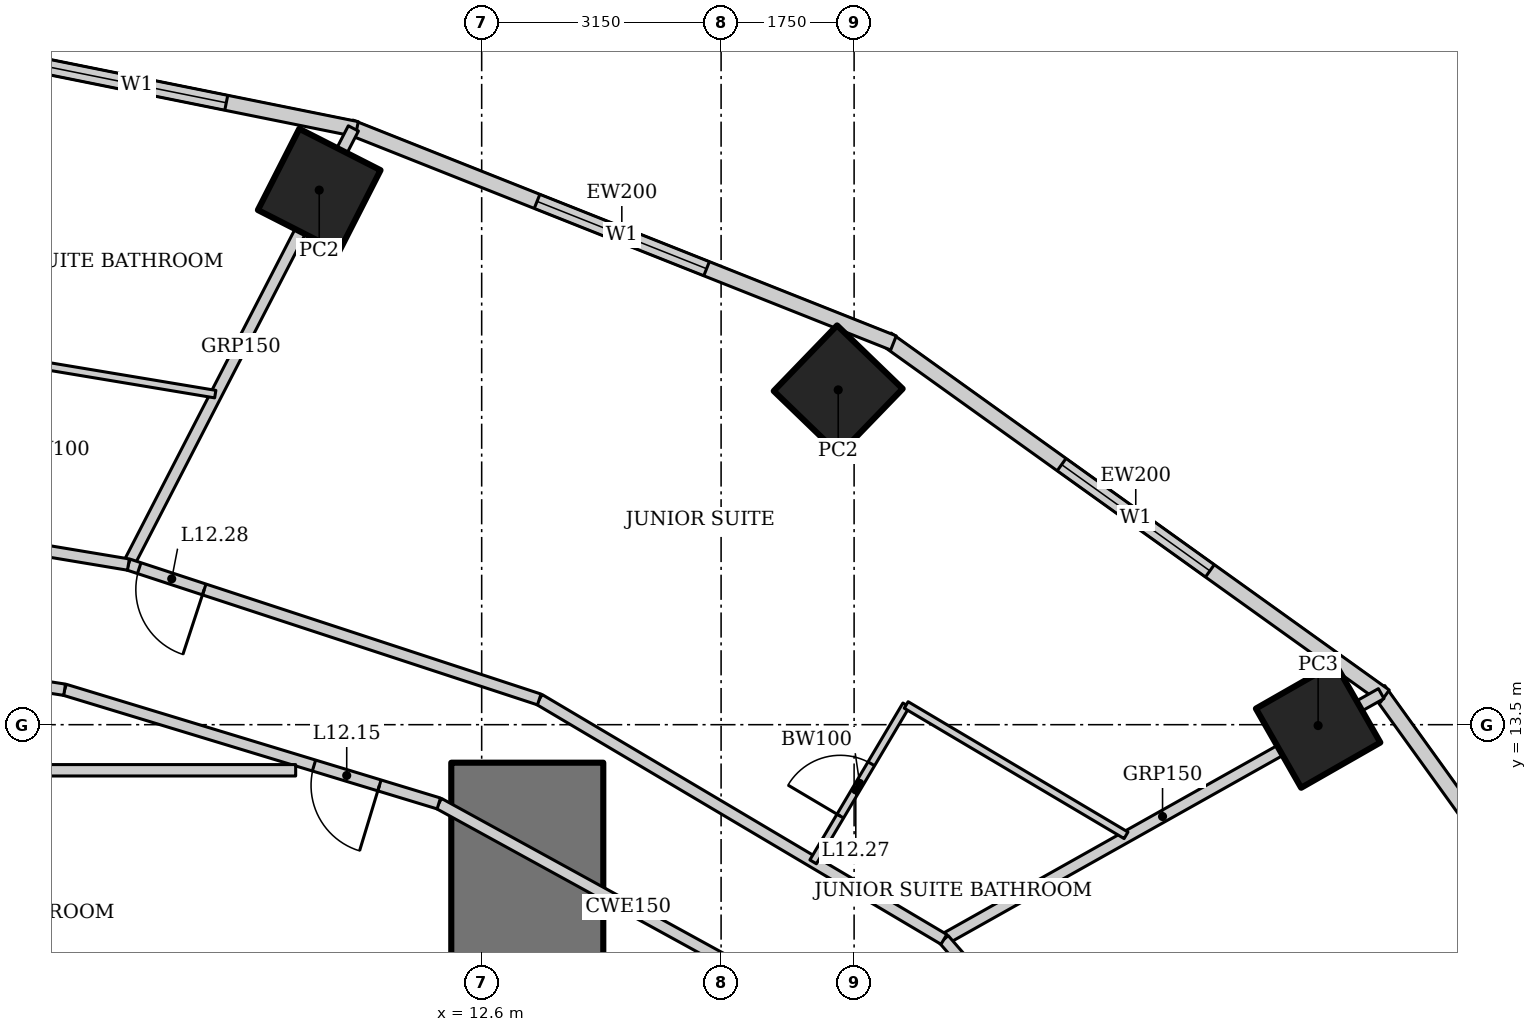
"""IFC4 building model, lengths in metres.
Left out: names, types, materials, properties, quantities, classifications, styles, units other than length and angle.
Written with IfcOpenShell. Run it as: python <this file> out.ifc"""

import sys

from ifc_helpers import new_model, si_unit, direction, frame, frame_2d, origin, origin_2d, place, context, subcontext, project, spatial, rectangle, hollow_rectangle, extrude, element, fill, save


model = new_model("IFC4")
c1 = context("Model", 3, precision=1e-05, world=origin(), true_north=direction((0.0, 1.0)))
c2 = subcontext(c1, "Body", "Model", "MODEL_VIEW")
j1 = project(units=[si_unit("LENGTHUNIT", "METRE"), si_unit("PLANEANGLEUNIT", "RADIAN")], contexts=[c1])
p1 = place(None, origin())
s1 = spatial("IfcSite", under=j1, at=p1, CompositionType="ELEMENT")
p2 = place(p1, origin())
s2 = spatial("IfcBuilding", under=s1, at=p2, CompositionType="ELEMENT")
p3 = place(p2, frame((0.0, 0.0, 58.6)))
s3 = spatial("IfcBuildingStorey", under=s2, at=p3, CompositionType="ELEMENT", Elevation=58.6)
p4 = place(p3, frame((23.605, 13.489, 0.0), z_axis=(0.0, 0.0, 1.0), x_axis=(0.86824298017, 0.496139221777, 0.0)))
e1 = element("IfcColumn", 1, at=p4, inside=s3, PredefinedType="COLUMN", context=c2, shape_type="SweptSolid", body=[
    extrude(hollow_rectangle(XDim=1.2, YDim=1.2, WallThickness=0.12, at=origin_2d()), origin(), (0.0, 0.0, 1.0), 3.6),
])
for number, where, z_axis, x_axis in (
    (2, (17.291, 17.905, 0.0), (0.0, 0.0, 1.0), (0.695, 0.719, 0.0)),
    (3, (10.463, 20.534, 0.0), (0.0, 0.0, 1.0), (0.454, 0.891, 0.0)),
):
    element("IfcColumn", number, at=place(p3, frame(where, z_axis=z_axis, x_axis=x_axis)), inside=s3, PredefinedType="COLUMN", context=c2, shape_type="SweptSolid", body=[
        extrude(hollow_rectangle(XDim=1.2, YDim=1.2, WallThickness=0.1, at=origin_2d()), origin(), (0.0, 0.0, 1.0), 3.6),
    ])
p5 = place(p3, frame((13.2, -13.0, 0.0), z_axis=(0.0, 0.0, 1.0), x_axis=(0.0, 1.0, 0.0)))
e4 = element("IfcWall", 4, at=p5, inside=s3, PredefinedType="SHEAR", context=c2, shape_type="SweptSolid", body=[
    extrude(rectangle(XDim=26.0, YDim=2.0, at=frame_2d((13.0, 0.0))), origin(), (0.0, 0.0, 1.0), 3.6),
])
p6 = place(p5, frame((12.1, 0.0, 0.0)))
e5 = element("IfcOpeningElement", 5, at=p6, cuts=e4, PredefinedType="OPENING", context=c2, shape_type="SweptSolid", body=[
    extrude(rectangle(XDim=1.8, YDim=2.1, at=frame_2d((0.9, 1.05))), frame((0.0, 1.01, 0.0), z_axis=(0.0, -1.0, 0.0), x_axis=(1.0, 0.0, 0.0)), (0.0, 0.0, 1.0), 2.02),
])
p7 = place(p3, frame((29.26, 7.2, 0.0), z_axis=(0.0, 0.0, 1.0), x_axis=(-0.583937613703, 0.811798536155, 0.0)))
e6 = element("IfcWall", 6, at=p7, inside=s3, PredefinedType="SOLIDWALL", context=c2, shape_type="SweptSolid", body=[
    extrude(rectangle(XDim=8.323, YDim=0.2, at=frame_2d((4.162, 0.0))), origin(), (0.0, 0.0, 1.0), 3.45),
])
p8 = place(p7, frame((2.961, 0.0, 0.5)))
e7 = element("IfcOpeningElement", 7, at=p8, cuts=e6, PredefinedType="OPENING", context=c2, shape_type="SweptSolid", body=[
    extrude(rectangle(XDim=2.4, YDim=2.2, at=frame_2d((1.2, 1.1))), frame((0.0, 0.11, 0.0), z_axis=(0.0, -1.0, 0.0), x_axis=(1.0, 0.0, 0.0)), (0.0, 0.0, 1.0), 0.22),
])
p9 = place(p3, frame((24.482, 13.875, 0.0), z_axis=(0.0, 0.0, 1.0), x_axis=(-0.812791321576, 0.582554948112, 0.0)))
e8 = element("IfcWall", 8, at=p9, inside=s3, PredefinedType="SOLIDWALL", context=c2, shape_type="SweptSolid", body=[
    extrude(rectangle(XDim=8.063, YDim=0.2, at=frame_2d((4.032, 0.0))), origin(), (0.0, 0.0, 1.0), 3.45),
])
p10 = place(p9, frame((2.832, 0.0, 0.5)))
e9 = element("IfcOpeningElement", 9, at=p10, cuts=e8, PredefinedType="OPENING", context=c2, shape_type="SweptSolid", body=[
    extrude(rectangle(XDim=2.4, YDim=2.2, at=frame_2d((1.2, 1.1))), frame((0.0, 0.11, 0.0), z_axis=(0.0, -1.0, 0.0), x_axis=(1.0, 0.0, 0.0)), (0.0, 0.0, 1.0), 0.22),
])
p11 = place(p3, frame((18.018, 18.523, 0.0), z_axis=(0.0, 0.0, 1.0), x_axis=(-0.929358351251, 0.369178892895, 0.0)))
e10 = element("IfcWall", 10, at=p11, inside=s3, PredefinedType="SOLIDWALL", context=c2, shape_type="SweptSolid", body=[
    extrude(rectangle(XDim=7.692, YDim=0.2, at=frame_2d((3.846, 0.0))), origin(), (0.0, 0.0, 1.0), 3.45),
])
p12 = place(p11, frame((2.646, 0.0, 0.5)))
e11 = element("IfcOpeningElement", 11, at=p12, cuts=e10, PredefinedType="OPENING", context=c2, shape_type="SweptSolid", body=[
    extrude(rectangle(XDim=2.4, YDim=2.2, at=frame_2d((1.2, 1.1))), frame((0.0, 0.11, 0.0), z_axis=(0.0, -1.0, 0.0), x_axis=(1.0, 0.0, 0.0)), (0.0, 0.0, 1.0), 0.22),
])
p13 = place(p3, frame((10.957, 21.337, 0.0), z_axis=(0.0, 0.0, 1.0), x_axis=(-0.980251657452, 0.197754110105, 0.0)))
e12 = element("IfcWall", 12, at=p13, inside=s3, PredefinedType="SOLIDWALL", context=c2, shape_type="SweptSolid", body=[
    extrude(rectangle(XDim=5.904, YDim=0.2, at=frame_2d((2.952, 0.0))), origin(), (0.0, 0.0, 1.0), 3.45),
])
p14 = place(p13, frame((1.752, 0.0, 0.5)))
e13 = element("IfcOpeningElement", 13, at=p14, cuts=e12, PredefinedType="OPENING", context=c2, shape_type="SweptSolid", body=[
    extrude(rectangle(XDim=2.4, YDim=2.2, at=frame_2d((1.2, 1.1))), frame((0.0, 0.11, 0.0), z_axis=(0.0, -1.0, 0.0), x_axis=(1.0, 0.0, 0.0)), (0.0, 0.0, 1.0), 0.22),
])
p15 = place(p3, frame((24.435, 13.909, 0.0), z_axis=(0.0, 0.0, 1.0), x_axis=(-0.871747379892, -0.489955616001, 0.0)))
e14 = element("IfcWall", 14, at=p15, inside=s3, PredefinedType="PARTITIONING", context=c2, shape_type="SweptSolid", body=[
    extrude(rectangle(XDim=6.6, YDim=0.15, at=frame_2d((3.3, 0.0))), origin(), (0.0, 0.0, 1.0), 2.693),
])
p16 = place(p3, frame((10.912, 21.346, 0.0), z_axis=(0.0, 0.0, 1.0), x_axis=(-0.458384799126, -0.888753833145, 0.0)))
e15 = element("IfcWall", 15, at=p16, inside=s3, PredefinedType="PARTITIONING", context=c2, shape_type="SweptSolid", body=[
    extrude(rectangle(XDim=6.457, YDim=0.15, at=frame_2d((3.229, 0.0))), origin(), (0.0, 0.0, 1.0), 2.528),
])
p17 = place(p3, frame((22.976, 5.729, 0.0), z_axis=(0.0, 0.0, 1.0), x_axis=(-0.655599989166, 0.755108372491, 0.0)))
e16 = element("IfcWall", 16, at=p17, inside=s3, PredefinedType="PARTITIONING", context=c2, shape_type="SweptSolid", body=[
    extrude(rectangle(XDim=6.551, YDim=0.15, at=frame_2d((3.275, 0.0))), origin(), (0.0, 0.0, 1.0), 3.45),
])
p18 = place(p17, frame((0.356, 0.0, 0.0)))
e17 = element("IfcOpeningElement", 17, at=p18, cuts=e16, PredefinedType="OPENING", context=c2, shape_type="SweptSolid", body=[
    extrude(rectangle(XDim=0.9, YDim=2.1, at=frame_2d((0.45, 1.05))), frame((0.0, 0.085, 0.0), z_axis=(0.0, -1.0, 0.0), x_axis=(1.0, 0.0, 0.0)), (0.0, 0.0, 1.0), 0.17),
])
p19 = place(p3, frame((18.681, 10.675, 0.0), z_axis=(0.0, 0.0, 1.0), x_axis=(-0.860147339762, 0.510045639036, 0.0)))
e18 = element("IfcWall", 18, at=p19, inside=s3, PredefinedType="PARTITIONING", context=c2, shape_type="SweptSolid", body=[
    extrude(rectangle(XDim=6.19, YDim=0.15, at=frame_2d((3.095, 0.0))), origin(), (0.0, 0.0, 1.0), 3.45),
])
p20 = place(p3, frame((13.357, 13.832, 0.0), z_axis=(0.0, 0.0, 1.0), x_axis=(-0.950106803111, 0.311924770869, 0.0)))
e19 = element("IfcWall", 19, at=p20, inside=s3, PredefinedType="PARTITIONING", context=c2, shape_type="SweptSolid", body=[
    extrude(rectangle(XDim=5.689, YDim=0.15, at=frame_2d((2.845, 0.0))), origin(), (0.0, 0.0, 1.0), 3.45),
])
p21 = place(p20, frame((4.639, 0.0, 0.0)))
e20 = element("IfcOpeningElement", 20, at=p21, cuts=e19, PredefinedType="OPENING", context=c2, shape_type="SweptSolid", body=[
    extrude(rectangle(XDim=0.9, YDim=2.1, at=frame_2d((0.45, 1.05))), frame((0.0, 0.085, 0.0), z_axis=(0.0, -1.0, 0.0), x_axis=(1.0, 0.0, 0.0)), (0.0, 0.0, 1.0), 0.17),
])
p22 = place(p3, frame((7.952, 15.607, 0.0), z_axis=(0.0, 0.0, 1.0), x_axis=(-0.98641101506, 0.164296407044, 0.0)))
e21 = element("IfcWall", 21, at=p22, inside=s3, PredefinedType="PARTITIONING", context=c2, shape_type="SweptSolid", body=[
    extrude(rectangle(XDim=4.245, YDim=0.15, at=frame_2d((2.123, 0.0))), origin(), (0.0, 0.0, 1.0), 3.45),
])
p23 = place(p3, frame((17.021, 9.726, 0.0), z_axis=(0.0, 0.0, 1.0), x_axis=(-0.876522084062, 0.481361647986, 0.0)))
e22 = element("IfcWall", 22, at=p23, inside=s3, PredefinedType="PARTITIONING", context=c2, shape_type="SweptSolid", body=[
    extrude(rectangle(XDim=5.687, YDim=0.15, at=frame_2d((2.844, 0.0))), origin(), (0.0, 0.0, 1.0), 3.45),
])
p24 = place(p3, frame((12.036, 12.464, 0.0), z_axis=(0.0, 0.0, 1.0), x_axis=(-0.956795045135, 0.290763205385, 0.0)))
e23 = element("IfcWall", 23, at=p24, inside=s3, PredefinedType="PARTITIONING", context=c2, shape_type="SweptSolid", body=[
    extrude(rectangle(XDim=5.146, YDim=0.15, at=frame_2d((2.573, 0.0))), origin(), (0.0, 0.0, 1.0), 3.45),
])
p25 = place(p24, frame((0.816, 0.0, 0.0)))
e24 = element("IfcOpeningElement", 24, at=p25, cuts=e23, PredefinedType="OPENING", context=c2, shape_type="SweptSolid", body=[
    extrude(rectangle(XDim=0.9, YDim=2.1, at=frame_2d((0.45, 1.05))), frame((0.0, 0.085, 0.0), z_axis=(0.0, -1.0, 0.0), x_axis=(1.0, 0.0, 0.0)), (0.0, 0.0, 1.0), 0.17),
])
p26 = place(p3, frame((7.113, 13.96, 0.0), z_axis=(0.0, 0.0, 1.0), x_axis=(-0.988343461108, 0.152240608529, 0.0)))
e25 = element("IfcWall", 25, at=p26, inside=s3, PredefinedType="PARTITIONING", context=c2, shape_type="SweptSolid", body=[
    extrude(rectangle(XDim=3.801, YDim=0.15, at=frame_2d((1.9, 0.0))), origin(), (0.0, 0.0, 1.0), 3.45),
])
p27 = place(p3, frame((10.153, 12.9, 0.0), z_axis=(0.0, 0.0, 1.0), x_axis=(-1.0, 0.0, 0.0)))
e26 = element("IfcWall", 26, at=p27, inside=s3, PredefinedType="PARTITIONING", context=c2, shape_type="SweptSolid", body=[
    extrude(rectangle(XDim=10.153, YDim=0.15, at=frame_2d((5.076, 0.0))), origin(), (0.0, 0.0, 1.0), 3.45),
])
p28 = place(p3, frame((16.961, 11.695, 0.0), z_axis=(0.0, 0.0, 1.0), x_axis=(0.510075642074, 0.860129548012, 0.0)))
e27 = element("IfcWall", 27, at=p28, inside=s3, PredefinedType="PARTITIONING", context=c2, shape_type="SweptSolid", body=[
    extrude(rectangle(XDim=2.4, YDim=0.1, at=frame_2d((1.2, 0.0))), origin(), (0.0, 0.0, 1.0), 3.45),
])
p29 = place(p28, frame((0.7, 0.0, 0.0)))
e28 = element("IfcOpeningElement", 28, at=p29, cuts=e27, PredefinedType="OPENING", context=c2, shape_type="SweptSolid", body=[
    extrude(rectangle(XDim=0.8, YDim=2.1, at=frame_2d((0.4, 1.05))), frame((0.0, 0.06, 0.0), z_axis=(0.0, -1.0, 0.0), x_axis=(1.0, 0.0, 0.0)), (0.0, 0.0, 1.0), 0.12),
])
p30 = place(p3, frame((18.185, 13.76, 0.0), z_axis=(0.0, 0.0, 1.0), x_axis=(0.860146437071, -0.510047161343, 0.0)))
e29 = element("IfcWall", 29, at=p30, inside=s3, PredefinedType="PARTITIONING", context=c2, shape_type="SweptSolid", body=[
    extrude(rectangle(XDim=3.363, YDim=0.1, at=frame_2d((1.681, 0.0))), origin(), (0.0, 0.0, 1.0), 3.45),
])
p31 = place(p3, frame((6.374, 18.303, 0.0), z_axis=(0.0, 0.0, 1.0), x_axis=(0.98640348956, -0.164341582641, 0.0)))
e30 = element("IfcWall", 30, at=p31, inside=s3, PredefinedType="PARTITIONING", context=c2, shape_type="SweptSolid", body=[
    extrude(rectangle(XDim=2.759, YDim=0.1, at=frame_2d((1.379, 0.0))), origin(), (0.0, 0.0, 1.0), 3.45),
])
p32 = place(p10, origin())
e31 = element("IfcWindow", 31, at=p32, inside=s3, PartitioningType="SINGLE_PANEL", PredefinedType="WINDOW", context=c2, shape_type="SweptSolid", body=[
    extrude(rectangle(XDim=2.4, YDim=2.2, at=frame_2d((1.2, 1.1))), frame((0.0, 0.03, 0.0), z_axis=(0.0, -1.0, 0.0), x_axis=(1.0, 0.0, 0.0)), (0.0, 0.0, 1.0), 0.06),
])
fill(e9, e31)
p33 = place(p12, origin())
e32 = element("IfcWindow", 32, at=p33, inside=s3, PartitioningType="SINGLE_PANEL", PredefinedType="WINDOW", context=c2, shape_type="SweptSolid", body=[
    extrude(rectangle(XDim=2.4, YDim=2.2, at=frame_2d((1.2, 1.1))), frame((0.0, 0.03, 0.0), z_axis=(0.0, -1.0, 0.0), x_axis=(1.0, 0.0, 0.0)), (0.0, 0.0, 1.0), 0.06),
])
fill(e11, e32)
p34 = place(p14, origin())
e33 = element("IfcWindow", 33, at=p34, inside=s3, PartitioningType="SINGLE_PANEL", PredefinedType="WINDOW", context=c2, shape_type="SweptSolid", body=[
    extrude(rectangle(XDim=2.4, YDim=2.2, at=frame_2d((1.2, 1.1))), frame((0.0, 0.03, 0.0), z_axis=(0.0, -1.0, 0.0), x_axis=(1.0, 0.0, 0.0)), (0.0, 0.0, 1.0), 0.06),
])
fill(e13, e33)
p35 = place(p25, origin())
e34 = element("IfcDoor", 34, at=p35, inside=s3, OperationType="SINGLE_SWING_LEFT", PredefinedType="DOOR", context=c2, shape_type="SweptSolid", body=[
    extrude(rectangle(XDim=0.9, YDim=2.1, at=frame_2d((0.45, 1.05))), frame((0.0, 0.025, 0.0), z_axis=(0.0, -1.0, 0.0), x_axis=(1.0, 0.0, 0.0)), (0.0, 0.0, 1.0), 0.05),
])
fill(e24, e34)
p36 = place(p29, origin())
e35 = element("IfcDoor", 35, at=p36, inside=s3, OperationType="SINGLE_SWING_LEFT", PredefinedType="DOOR", context=c2, shape_type="SweptSolid", body=[
    extrude(rectangle(XDim=0.8, YDim=2.1, at=frame_2d((0.4, 1.05))), frame((0.0, 0.025, 0.0), z_axis=(0.0, -1.0, 0.0), x_axis=(1.0, 0.0, 0.0)), (0.0, 0.0, 1.0), 0.05),
])
fill(e28, e35)
p37 = place(p21, origin())
e36 = element("IfcDoor", 36, at=p37, inside=s3, OperationType="SINGLE_SWING_LEFT", PredefinedType="DOOR", context=c2, shape_type="SweptSolid", body=[
    extrude(rectangle(XDim=0.9, YDim=2.1, at=frame_2d((0.45, 1.05))), frame((0.0, 0.025, 0.0), z_axis=(0.0, -1.0, 0.0), x_axis=(1.0, 0.0, 0.0)), (0.0, 0.0, 1.0), 0.05),
])
fill(e20, e36)
save(model, sys.argv[1])
